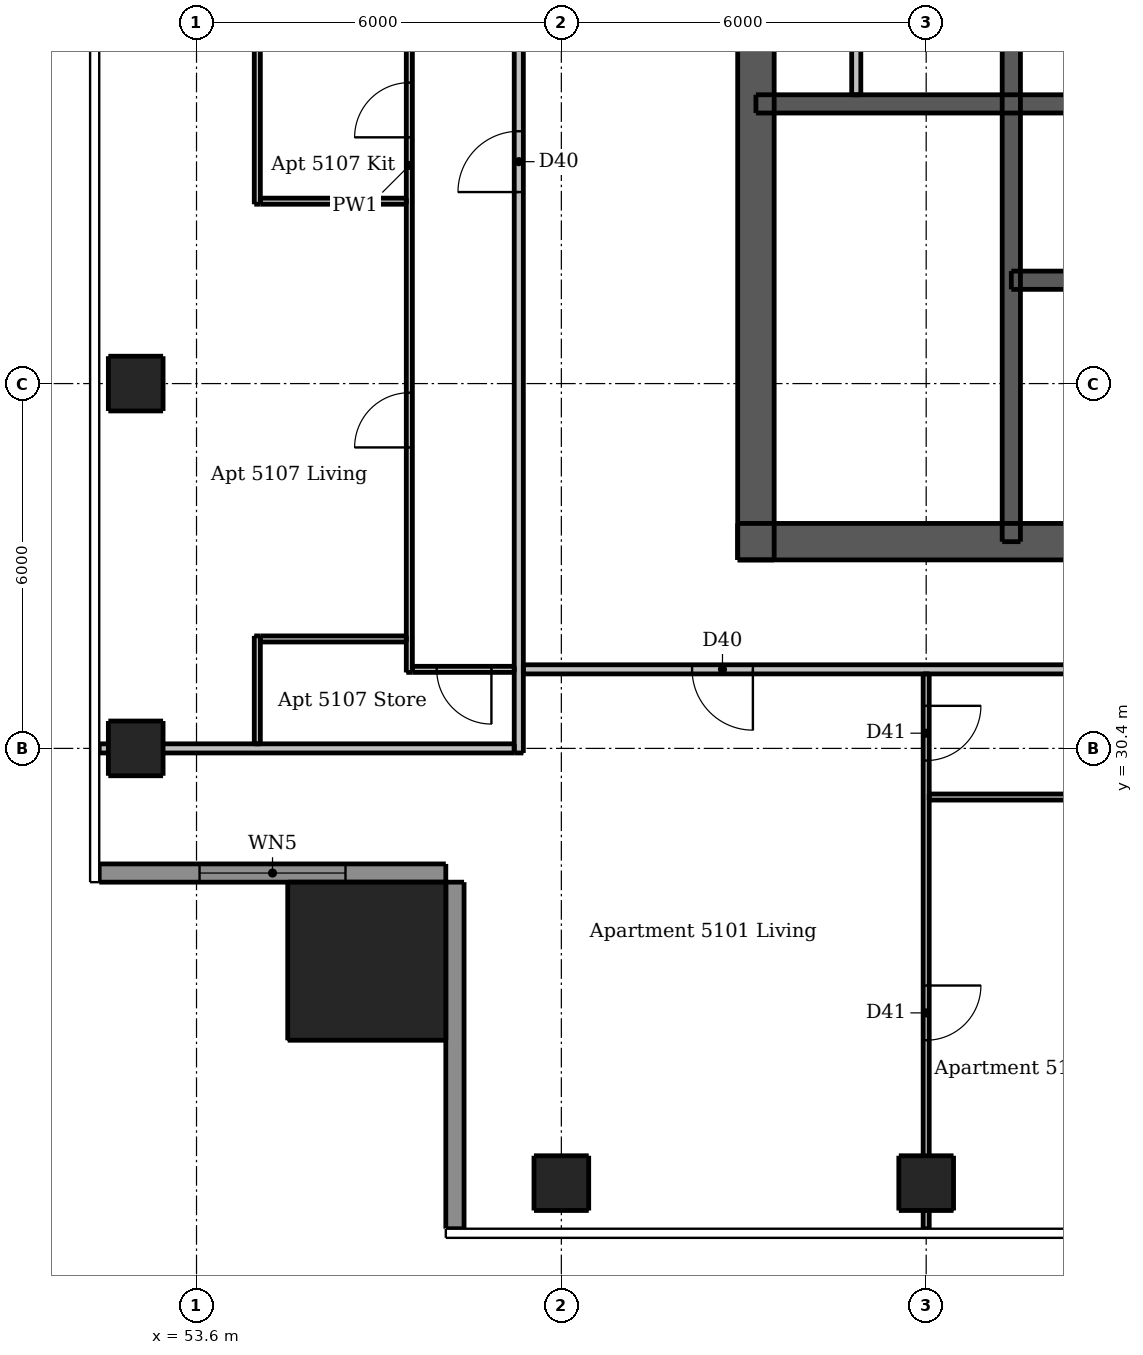
"""IFC4 building model, lengths in metres.
Left out: names, types, materials, properties, quantities, classifications, styles, units other than length and angle.
Written with IfcOpenShell. Run it as: python <this file> out.ifc"""

import sys

from ifc_helpers import new_model, si_unit, direction, frame, frame_2d, origin, origin_2d, place, context, subcontext, project, spatial, rectangle, extrude, element, fill, save


model = new_model("IFC4")
c1 = context("Model", 3, precision=1e-05, world=origin(), true_north=direction((0.0, 1.0)))
c2 = subcontext(c1, "Body", "Model", "MODEL_VIEW")
j1 = project(units=[si_unit("LENGTHUNIT", "METRE"), si_unit("PLANEANGLEUNIT", "RADIAN")], contexts=[c1])
p1 = place(None, origin())
s1 = spatial("IfcSite", under=j1, at=p1, CompositionType="ELEMENT")
p2 = place(p1, origin())
s2 = spatial("IfcBuilding", under=s1, at=p2, CompositionType="ELEMENT")
p3 = place(p2, frame((0.0, 0.0, 193.6)))
s3 = spatial("IfcBuildingStorey", under=s2, at=p3, CompositionType="ELEMENT", Elevation=193.6)
p4 = place(p3, frame((62.5, 33.8, 0.0), z_axis=(0.0, 0.0, 1.0), x_axis=(1.0, 0.0, 0.0)))
e1 = element("IfcWall", 1, at=p4, inside=s3, PredefinedType="SHEAR", context=c2, shape_type="SweptSolid", body=[
    extrude(rectangle(XDim=24.0, YDim=0.6, at=frame_2d((12.0, 0.0))), origin(), (0.0, 0.0, 1.0), 3.05),
])
p5 = place(p4, frame((1.925, 0.0, 0.0)))
e2 = element("IfcOpeningElement", 2, at=p5, cuts=e1, PredefinedType="OPENING", context=c2, shape_type="SweptSolid", body=[
    extrude(rectangle(XDim=1.1, YDim=2.1, at=frame_2d((0.55, 1.05))), frame((0.0, 0.31, 0.0), z_axis=(0.0, -1.0, 0.0), x_axis=(1.0, 0.0, 0.0)), (0.0, 0.0, 1.0), 0.62),
])
p6 = place(p4, frame((20.975, 0.0, 0.0)))
e3 = element("IfcOpeningElement", 3, at=p6, cuts=e1, PredefinedType="OPENING", context=c2, shape_type="SweptSolid", body=[
    extrude(rectangle(XDim=1.1, YDim=2.1, at=frame_2d((0.55, 1.05))), frame((0.0, 0.31, 0.0), z_axis=(0.0, -1.0, 0.0), x_axis=(1.0, 0.0, 0.0)), (0.0, 0.0, 1.0), 0.62),
])
p7 = place(p4, frame((8.0, 0.0, 0.0)))
e4 = element("IfcOpeningElement", 4, at=p7, cuts=e1, PredefinedType="OPENING", context=c2, shape_type="SweptSolid", body=[
    extrude(rectangle(XDim=1.1, YDim=2.1, at=frame_2d((0.55, 1.05))), frame((0.0, 0.31, 0.0), z_axis=(0.0, -1.0, 0.0), x_axis=(1.0, 0.0, 0.0)), (0.0, 0.0, 1.0), 0.62),
])
p8 = place(p4, frame((13.5, 0.0, 0.0)))
e5 = element("IfcOpeningElement", 5, at=p8, cuts=e1, PredefinedType="OPENING", context=c2, shape_type="SweptSolid", body=[
    extrude(rectangle(XDim=0.9, YDim=2.1, at=frame_2d((0.45, 1.05))), frame((0.0, 0.31, 0.0), z_axis=(0.0, -1.0, 0.0), x_axis=(1.0, 0.0, 0.0)), (0.0, 0.0, 1.0), 0.62),
])
p9 = place(p4, frame((17.1, 0.0, 0.0)))
e6 = element("IfcOpeningElement", 6, at=p9, cuts=e1, PredefinedType="OPENING", context=c2, shape_type="SweptSolid", body=[
    extrude(rectangle(XDim=0.9, YDim=2.1, at=frame_2d((0.45, 1.05))), frame((0.0, 0.31, 0.0), z_axis=(0.0, -1.0, 0.0), x_axis=(1.0, 0.0, 0.0)), (0.0, 0.0, 1.0), 0.62),
])
p10 = place(p3, frame((62.8, 33.5, 0.0), z_axis=(0.0, 0.0, 1.0), x_axis=(0.0, 1.0, 0.0)))
e7 = element("IfcWall", 7, at=p10, inside=s3, PredefinedType="SHEAR", context=c2, shape_type="SweptSolid", body=[
    extrude(rectangle(XDim=24.0, YDim=0.6, at=frame_2d((12.0, 0.0))), origin(), (0.0, 0.0, 1.0), 3.05),
])
p11 = place(p10, frame((11.2, 0.0, 0.0)))
e8 = element("IfcOpeningElement", 8, at=p11, cuts=e7, PredefinedType="OPENING", context=c2, shape_type="SweptSolid", body=[
    extrude(rectangle(XDim=1.6, YDim=2.1, at=frame_2d((0.8, 1.05))), frame((0.0, 0.31, 0.0), z_axis=(0.0, -1.0, 0.0), x_axis=(1.0, 0.0, 0.0)), (0.0, 0.0, 1.0), 0.62),
])
p12 = place(p3, frame((62.8, 41.0, 0.0), z_axis=(0.0, 0.0, 1.0), x_axis=(1.0, 0.0, 0.0)))
e9 = element("IfcWall", 9, at=p12, inside=s3, PredefinedType="SHEAR", context=c2, shape_type="SweptSolid", body=[
    extrude(rectangle(XDim=23.4, YDim=0.3, at=frame_2d((11.7, 0.0))), origin(), (0.0, 0.0, 1.0), 3.05),
])
p13 = place(p3, frame((67.0, 33.8, 0.0), z_axis=(0.0, 0.0, 1.0), x_axis=(0.0, 1.0, 0.0)))
e10 = element("IfcWall", 10, at=p13, inside=s3, PredefinedType="SHEAR", context=c2, shape_type="SweptSolid", body=[
    extrude(rectangle(XDim=10.1, YDim=0.3, at=frame_2d((5.05, 0.0))), origin(), (0.0, 0.0, 1.0), 3.05),
])
p14 = place(p13, frame((0.5, 0.0, 0.0)))
e11 = element("IfcOpeningElement", 11, at=p14, cuts=e10, PredefinedType="OPENING", context=c2, shape_type="SweptSolid", body=[
    extrude(rectangle(XDim=1.1, YDim=2.1, at=frame_2d((0.55, 1.05))), frame((0.0, 0.16, 0.0), z_axis=(0.0, -1.0, 0.0), x_axis=(1.0, 0.0, 0.0)), (0.0, 0.0, 1.0), 0.32),
])
p15 = place(p3, frame((67.0, 38.1, 0.0), z_axis=(0.0, 0.0, 1.0), x_axis=(1.0, 0.0, 0.0)))
e12 = element("IfcWall", 12, at=p15, inside=s3, PredefinedType="SHEAR", context=c2, shape_type="SweptSolid", body=[
    extrude(rectangle(XDim=7.5, YDim=0.3, at=frame_2d((3.75, 0.0))), origin(), (0.0, 0.0, 1.0), 3.05),
])
p16 = place(p15, frame((0.7, 0.0, 0.0)))
e13 = element("IfcOpeningElement", 13, at=p16, cuts=e12, PredefinedType="OPENING", context=c2, shape_type="SweptSolid", body=[
    extrude(rectangle(XDim=1.1, YDim=2.1, at=frame_2d((0.55, 1.05))), frame((0.0, 0.16, 0.0), z_axis=(0.0, -1.0, 0.0), x_axis=(1.0, 0.0, 0.0)), (0.0, 0.0, 1.0), 0.32),
])
p17 = place(p15, frame((3.2, 0.0, 0.0)))
e14 = element("IfcOpeningElement", 14, at=p17, cuts=e12, PredefinedType="OPENING", context=c2, shape_type="SweptSolid", body=[
    extrude(rectangle(XDim=1.1, YDim=2.1, at=frame_2d((0.55, 1.05))), frame((0.0, 0.16, 0.0), z_axis=(0.0, -1.0, 0.0), x_axis=(1.0, 0.0, 0.0)), (0.0, 0.0, 1.0), 0.32),
])
p18 = place(p15, frame((5.65, 0.0, 0.0)))
e15 = element("IfcOpeningElement", 15, at=p18, cuts=e12, PredefinedType="OPENING", context=c2, shape_type="SweptSolid", body=[
    extrude(rectangle(XDim=1.2, YDim=2.1, at=frame_2d((0.6, 1.05))), frame((0.0, 0.16, 0.0), z_axis=(0.0, -1.0, 0.0), x_axis=(1.0, 0.0, 0.0)), (0.0, 0.0, 1.0), 0.32),
])
for number, where, z_axis, x_axis in (
    (16, (59.6, 23.25, 0.0), (0.0, 0.0, 1.0), (1.0, 0.0, 0.0)),
    (17, (65.6, 23.25, 0.0), (0.0, 0.0, 1.0), (1.0, 0.0, 0.0)),
    (18, (52.6, 30.4, 0.0), (0.0, 0.0, 1.0), (1.0, 0.0, 0.0)),
    (19, (52.6, 36.4, 0.0), (0.0, 0.0, 1.0), (1.0, 0.0, 0.0)),
):
    element("IfcColumn", number, at=place(p3, frame(where, z_axis=z_axis, x_axis=x_axis)), inside=s3, PredefinedType="COLUMN", context=c2, shape_type="SweptSolid", body=[
        extrude(rectangle(XDim=0.9, YDim=0.9, at=origin_2d()), origin(), (0.0, 0.0, 1.0), 3.05),
    ])
p19 = place(p3, frame((56.4, 26.9, 0.0), z_axis=(0.0, 0.0, 1.0), x_axis=(1.0, 0.0, 0.0)))
e20 = element("IfcColumn", 20, at=p19, inside=s3, PredefinedType="COLUMN", context=c2, shape_type="SweptSolid", body=[
    extrude(rectangle(XDim=2.6, YDim=2.6, at=origin_2d()), origin(), (0.0, 0.0, 1.0), 3.3),
])
p20 = place(p3, frame((52.0, 28.35, 0.0), z_axis=(0.0, 0.0, 1.0), x_axis=(1.0, 0.0, 0.0)))
e21 = element("IfcWall", 21, at=p20, inside=s3, PredefinedType="SOLIDWALL", context=c2, shape_type="SweptSolid", body=[
    extrude(rectangle(XDim=5.7, YDim=0.3, at=frame_2d((2.85, 0.0))), origin(), (0.0, 0.0, 1.0), 3.05),
])
p21 = place(p20, frame((1.65, 0.0, 0.15)))
e22 = element("IfcOpeningElement", 22, at=p21, cuts=e21, PredefinedType="OPENING", context=c2, shape_type="SweptSolid", body=[
    extrude(rectangle(XDim=2.4, YDim=2.1, at=frame_2d((1.2, 1.05))), frame((0.0, 0.16, 0.0), z_axis=(0.0, -1.0, 0.0), x_axis=(1.0, 0.0, 0.0)), (0.0, 0.0, 1.0), 0.32),
])
p22 = place(p3, frame((57.85, 28.2, 0.0), z_axis=(0.0, 0.0, 1.0), x_axis=(0.0, -1.0, 0.0)))
e23 = element("IfcWall", 23, at=p22, inside=s3, PredefinedType="SOLIDWALL", context=c2, shape_type="SweptSolid", body=[
    extrude(rectangle(XDim=5.7, YDim=0.3, at=frame_2d((2.85, 0.0))), origin(), (0.0, 0.0, 1.0), 3.05),
])
p23 = place(p3, frame((64.45, 41.15, 0.0), z_axis=(0.0, 0.0, 1.0), x_axis=(0.0, 1.0, 0.0)))
e24 = element("IfcWall", 24, at=p23, inside=s3, PredefinedType="PLUMBINGWALL", context=c2, shape_type="SweptSolid", body=[
    extrude(rectangle(XDim=2.6, YDim=0.15, at=frame_2d((1.3, 0.0))), origin(), (0.0, 0.0, 1.0), 3.05),
])
p24 = place(p3, frame((54.6, 30.475, 0.0), z_axis=(0.0, 0.0, 1.0), x_axis=(0.0, 1.0, 0.0)))
e25 = element("IfcWall", 25, at=p24, inside=s3, PredefinedType="PARTITIONING", context=c2, shape_type="SweptSolid", body=[
    extrude(rectangle(XDim=1.775, YDim=0.1, at=frame_2d((0.887, 0.0))), origin(), (0.0, 0.0, 1.0), 3.05),
])
p25 = place(p3, frame((54.6, 39.35, 0.0), z_axis=(0.0, 0.0, 1.0), x_axis=(0.0, 1.0, 0.0)))
e26 = element("IfcWall", 26, at=p25, inside=s3, PredefinedType="PARTITIONING", context=c2, shape_type="SweptSolid", body=[
    extrude(rectangle(XDim=5.5, YDim=0.1, at=frame_2d((2.75, 0.0))), origin(), (0.0, 0.0, 1.0), 3.05),
])
p26 = place(p3, frame((57.1, 31.65, 0.0), z_axis=(0.0, 0.0, 1.0), x_axis=(0.0, 1.0, 0.0)))
e27 = element("IfcWall", 27, at=p26, inside=s3, PredefinedType="PARTITIONING", context=c2, shape_type="SweptSolid", body=[
    extrude(rectangle(XDim=16.675, YDim=0.1, at=frame_2d((8.337, 0.0))), origin(), (0.0, 0.0, 1.0), 3.05),
])
p27 = place(p26, frame((3.7, 0.0, 0.0)))
e28 = element("IfcOpeningElement", 28, at=p27, cuts=e27, PredefinedType="OPENING", context=c2, shape_type="SweptSolid", body=[
    extrude(rectangle(XDim=0.9, YDim=2.1, at=frame_2d((0.45, 1.05))), frame((0.0, 0.06, 0.0), z_axis=(0.0, -1.0, 0.0), x_axis=(1.0, 0.0, 0.0)), (0.0, 0.0, 1.0), 0.12),
])
p28 = place(p26, frame((8.8, 0.0, 0.0)))
e29 = element("IfcOpeningElement", 29, at=p28, cuts=e27, PredefinedType="OPENING", context=c2, shape_type="SweptSolid", body=[
    extrude(rectangle(XDim=0.9, YDim=2.1, at=frame_2d((0.45, 1.05))), frame((0.0, 0.06, 0.0), z_axis=(0.0, -1.0, 0.0), x_axis=(1.0, 0.0, 0.0)), (0.0, 0.0, 1.0), 0.12),
])
p29 = place(p26, frame((14.5, 0.0, 0.0)))
e30 = element("IfcOpeningElement", 30, at=p29, cuts=e27, PredefinedType="OPENING", context=c2, shape_type="SweptSolid", body=[
    extrude(rectangle(XDim=0.9, YDim=2.1, at=frame_2d((0.45, 1.05))), frame((0.0, 0.06, 0.0), z_axis=(0.0, -1.0, 0.0), x_axis=(1.0, 0.0, 0.0)), (0.0, 0.0, 1.0), 0.12),
])
p30 = place(p26, frame((11.55, 0.0, 0.0)))
e31 = element("IfcOpeningElement", 31, at=p30, cuts=e27, PredefinedType="OPENING", context=c2, shape_type="SweptSolid", body=[
    extrude(rectangle(XDim=0.8, YDim=2.1, at=frame_2d((0.4, 1.05))), frame((0.0, 0.06, 0.0), z_axis=(0.0, -1.0, 0.0), x_axis=(1.0, 0.0, 0.0)), (0.0, 0.0, 1.0), 0.12),
])
p31 = place(p3, frame((65.6, 31.625, 0.0), z_axis=(0.0, 0.0, 1.0), x_axis=(0.0, -1.0, 0.0)))
e32 = element("IfcWall", 32, at=p31, inside=s3, PredefinedType="PARTITIONING", context=c2, shape_type="SweptSolid", body=[
    extrude(rectangle(XDim=9.125, YDim=0.1, at=frame_2d((4.562, 0.0))), origin(), (0.0, 0.0, 1.0), 2.516),
])
p32 = place(p31, frame((0.525, 0.0, 0.0)))
e33 = element("IfcOpeningElement", 33, at=p32, cuts=e32, PredefinedType="OPENING", context=c2, shape_type="SweptSolid", body=[
    extrude(rectangle(XDim=0.9, YDim=2.1, at=frame_2d((0.45, 1.05))), frame((0.0, 0.06, 0.0), z_axis=(0.0, -1.0, 0.0), x_axis=(1.0, 0.0, 0.0)), (0.0, 0.0, 1.0), 0.12),
])
p33 = place(p31, frame((5.125, 0.0, 0.0)))
e34 = element("IfcOpeningElement", 34, at=p33, cuts=e32, PredefinedType="OPENING", context=c2, shape_type="SweptSolid", body=[
    extrude(rectangle(XDim=0.9, YDim=2.1, at=frame_2d((0.45, 1.05))), frame((0.0, 0.06, 0.0), z_axis=(0.0, -1.0, 0.0), x_axis=(1.0, 0.0, 0.0)), (0.0, 0.0, 1.0), 0.12),
])
for number, where, z_axis, x_axis in (
    (35, (54.65, 39.4, 0.0), (0.0, 0.0, 1.0), (1.0, 0.0, 0.0)),
    (36, (54.65, 32.2, 0.0), (0.0, 0.0, 1.0), (1.0, 0.0, 0.0)),
):
    element("IfcWall", number, at=place(p3, frame(where, z_axis=z_axis, x_axis=x_axis)), inside=s3, PredefinedType="PARTITIONING", context=c2, shape_type="SweptSolid", body=[
        extrude(rectangle(XDim=2.4, YDim=0.1, at=frame_2d((1.2, 0.0))), origin(), (0.0, 0.0, 1.0), 3.05),
    ])
p34 = place(p3, frame((58.825, 31.7, 0.0), z_axis=(0.0, 0.0, 1.0), x_axis=(-1.0, 0.0, 0.0)))
e37 = element("IfcWall", 37, at=p34, inside=s3, PredefinedType="PARTITIONING", context=c2, shape_type="SweptSolid", body=[
    extrude(rectangle(XDim=1.675, YDim=0.1, at=frame_2d((0.837, 0.0))), origin(), (0.0, 0.0, 1.0), 3.05),
])
p35 = place(p34, frame((0.375, 0.0, 0.0)))
e38 = element("IfcOpeningElement", 38, at=p35, cuts=e37, PredefinedType="OPENING", context=c2, shape_type="SweptSolid", body=[
    extrude(rectangle(XDim=0.9, YDim=2.1, at=frame_2d((0.45, 1.05))), frame((0.0, 0.06, 0.0), z_axis=(0.0, -1.0, 0.0), x_axis=(1.0, 0.0, 0.0)), (0.0, 0.0, 1.0), 0.12),
])
p36 = place(p3, frame((65.65, 29.6, 0.0), z_axis=(0.0, 0.0, 1.0), x_axis=(1.0, 0.0, 0.0)))
e39 = element("IfcWall", 39, at=p36, inside=s3, PredefinedType="PARTITIONING", context=c2, shape_type="SweptSolid", body=[
    extrude(rectangle(XDim=5.875, YDim=0.1, at=frame_2d((2.938, 0.0))), origin(), (0.0, 0.0, 1.0), 3.05),
])
p37 = place(p36, frame((3.75, 0.0, 0.0)))
e40 = element("IfcOpeningElement", 40, at=p37, cuts=e39, PredefinedType="OPENING", context=c2, shape_type="SweptSolid", body=[
    extrude(rectangle(XDim=0.8, YDim=2.1, at=frame_2d((0.4, 1.05))), frame((0.0, 0.06, 0.0), z_axis=(0.0, -1.0, 0.0), x_axis=(1.0, 0.0, 0.0)), (0.0, 0.0, 1.0), 0.12),
])
p38 = place(p3, frame((58.9, 30.325, 0.0), z_axis=(0.0, 0.0, 1.0), x_axis=(0.0, 1.0, 0.0)))
e41 = element("IfcWall", 41, at=p38, inside=s3, PredefinedType="PARTITIONING", context=c2, shape_type="SweptSolid", body=[
    extrude(rectangle(XDim=30.85, YDim=0.15, at=frame_2d((15.425, 0.0))), origin(), (0.0, 0.0, 1.0), 3.05),
])
p39 = place(p38, frame((9.225, 0.0, 0.0)))
e42 = element("IfcOpeningElement", 42, at=p39, cuts=e41, PredefinedType="OPENING", context=c2, shape_type="SweptSolid", body=[
    extrude(rectangle(XDim=1.0, YDim=2.1, at=frame_2d((0.5, 1.05))), frame((0.0, 0.085, 0.0), z_axis=(0.0, -1.0, 0.0), x_axis=(1.0, 0.0, 0.0)), (0.0, 0.0, 1.0), 0.17),
])
p40 = place(p38, frame((26.925, 0.0, 0.0)))
e43 = element("IfcOpeningElement", 43, at=p40, cuts=e41, PredefinedType="OPENING", context=c2, shape_type="SweptSolid", body=[
    extrude(rectangle(XDim=1.0, YDim=2.1, at=frame_2d((0.5, 1.05))), frame((0.0, 0.085, 0.0), z_axis=(0.0, -1.0, 0.0), x_axis=(1.0, 0.0, 0.0)), (0.0, 0.0, 1.0), 0.17),
])
p41 = place(p3, frame((89.525, 31.7, 0.0), z_axis=(0.0, 0.0, 1.0), x_axis=(-1.0, 0.0, 0.0)))
e44 = element("IfcWall", 44, at=p41, inside=s3, PredefinedType="PARTITIONING", context=c2, shape_type="SweptSolid", body=[
    extrude(rectangle(XDim=30.55, YDim=0.15, at=frame_2d((15.275, 0.0))), origin(), (0.0, 0.0, 1.0), 3.05),
])
p42 = place(p41, frame((26.775, 0.0, 0.0)))
e45 = element("IfcOpeningElement", 45, at=p42, cuts=e44, PredefinedType="OPENING", context=c2, shape_type="SweptSolid", body=[
    extrude(rectangle(XDim=1.0, YDim=2.1, at=frame_2d((0.5, 1.05))), frame((0.0, 0.085, 0.0), z_axis=(0.0, -1.0, 0.0), x_axis=(1.0, 0.0, 0.0)), (0.0, 0.0, 1.0), 0.17),
])
p43 = place(p41, frame((9.075, 0.0, 0.0)))
e46 = element("IfcOpeningElement", 46, at=p43, cuts=e44, PredefinedType="OPENING", context=c2, shape_type="SweptSolid", body=[
    extrude(rectangle(XDim=1.0, YDim=2.1, at=frame_2d((0.5, 1.05))), frame((0.0, 0.085, 0.0), z_axis=(0.0, -1.0, 0.0), x_axis=(1.0, 0.0, 0.0)), (0.0, 0.0, 1.0), 0.17),
])
p44 = place(p3, frame((52.0, 30.4, 0.0), z_axis=(0.0, 0.0, 1.0), x_axis=(1.0, 0.0, 0.0)))
e47 = element("IfcWall", 47, at=p44, inside=s3, PredefinedType="PARTITIONING", context=c2, shape_type="SweptSolid", body=[
    extrude(rectangle(XDim=6.825, YDim=0.15, at=frame_2d((3.413, 0.0))), origin(), (0.0, 0.0, 1.0), 2.647),
])
p45 = place(p21, origin())
e48 = element("IfcWindow", 48, at=p45, inside=s3, PartitioningType="DOUBLE_PANEL_VERTICAL", PredefinedType="WINDOW", context=c2, shape_type="SweptSolid", body=[
    extrude(rectangle(XDim=2.4, YDim=2.1, at=frame_2d((1.2, 1.05))), frame((0.0, 0.03, 0.0), z_axis=(0.0, -1.0, 0.0), x_axis=(1.0, 0.0, 0.0)), (0.0, 0.0, 1.0), 0.06),
])
fill(e22, e48)
p46 = place(p5, origin())
e49 = element("IfcDoor", 49, at=p46, inside=s3, OperationType="SINGLE_SWING_LEFT", PredefinedType="DOOR", context=c2, shape_type="SweptSolid", body=[
    extrude(rectangle(XDim=1.1, YDim=2.1, at=frame_2d((0.55, 1.05))), frame((0.0, 0.288, 0.0), z_axis=(0.0, -1.0, 0.0), x_axis=(1.0, 0.0, 0.0)), (0.0, 0.0, 1.0), 0.05),
])
fill(e2, e49)
p47 = place(p14, origin())
e50 = element("IfcDoor", 50, at=p47, inside=s3, OperationType="SINGLE_SWING_RIGHT", PredefinedType="DOOR", context=c2, shape_type="SweptSolid", body=[
    extrude(rectangle(XDim=1.1, YDim=2.1, at=frame_2d((0.55, 1.05))), frame((0.0, -0.087, 0.0), z_axis=(0.0, -1.0, 0.0), x_axis=(1.0, 0.0, 0.0)), (0.0, 0.0, 1.0), 0.05),
])
fill(e11, e50)
p48 = place(p16, origin())
e51 = element("IfcDoor", 51, at=p48, inside=s3, OperationType="DOUBLE_DOOR_SLIDING", PredefinedType="DOOR", context=c2, shape_type="SweptSolid", body=[
    extrude(rectangle(XDim=1.1, YDim=2.1, at=frame_2d((0.55, 1.05))), frame((0.0, 0.025, 0.0), z_axis=(0.0, -1.0, 0.0), x_axis=(1.0, 0.0, 0.0)), (0.0, 0.0, 1.0), 0.05),
])
fill(e13, e51)
p49 = place(p42, origin())
e52 = element("IfcDoor", 52, at=p49, inside=s3, OperationType="SINGLE_SWING_LEFT", PredefinedType="DOOR", context=c2, shape_type="SweptSolid", body=[
    extrude(rectangle(XDim=1.0, YDim=2.1, at=frame_2d((0.5, 1.05))), frame((0.0, 0.025, 0.0), z_axis=(0.0, -1.0, 0.0), x_axis=(1.0, 0.0, 0.0)), (0.0, 0.0, 1.0), 0.05),
])
fill(e45, e52)
p50 = place(p32, origin())
e53 = element("IfcDoor", 53, at=p50, inside=s3, OperationType="SINGLE_SWING_LEFT", PredefinedType="DOOR", context=c2, shape_type="SweptSolid", body=[
    extrude(rectangle(XDim=0.9, YDim=2.1, at=frame_2d((0.45, 1.05))), frame((0.0, 0.025, 0.0), z_axis=(0.0, -1.0, 0.0), x_axis=(1.0, 0.0, 0.0)), (0.0, 0.0, 1.0), 0.05),
])
fill(e33, e53)
p51 = place(p33, origin())
e54 = element("IfcDoor", 54, at=p51, inside=s3, OperationType="SINGLE_SWING_LEFT", PredefinedType="DOOR", context=c2, shape_type="SweptSolid", body=[
    extrude(rectangle(XDim=0.9, YDim=2.1, at=frame_2d((0.45, 1.05))), frame((0.0, 0.025, 0.0), z_axis=(0.0, -1.0, 0.0), x_axis=(1.0, 0.0, 0.0)), (0.0, 0.0, 1.0), 0.05),
])
fill(e34, e54)
p52 = place(p39, origin())
e55 = element("IfcDoor", 55, at=p52, inside=s3, OperationType="SINGLE_SWING_LEFT", PredefinedType="DOOR", context=c2, shape_type="SweptSolid", body=[
    extrude(rectangle(XDim=1.0, YDim=2.1, at=frame_2d((0.5, 1.05))), frame((0.0, 0.025, 0.0), z_axis=(0.0, -1.0, 0.0), x_axis=(1.0, 0.0, 0.0)), (0.0, 0.0, 1.0), 0.05),
])
fill(e42, e55)
p53 = place(p27, origin())
e56 = element("IfcDoor", 56, at=p53, inside=s3, OperationType="SINGLE_SWING_LEFT", PredefinedType="DOOR", context=c2, shape_type="SweptSolid", body=[
    extrude(rectangle(XDim=0.9, YDim=2.1, at=frame_2d((0.45, 1.05))), frame((0.0, 0.025, 0.0), z_axis=(0.0, -1.0, 0.0), x_axis=(1.0, 0.0, 0.0)), (0.0, 0.0, 1.0), 0.05),
])
fill(e28, e56)
p54 = place(p28, origin())
e57 = element("IfcDoor", 57, at=p54, inside=s3, OperationType="SINGLE_SWING_LEFT", PredefinedType="DOOR", context=c2, shape_type="SweptSolid", body=[
    extrude(rectangle(XDim=0.9, YDim=2.1, at=frame_2d((0.45, 1.05))), frame((0.0, 0.025, 0.0), z_axis=(0.0, -1.0, 0.0), x_axis=(1.0, 0.0, 0.0)), (0.0, 0.0, 1.0), 0.05),
])
fill(e29, e57)
p55 = place(p35, origin())
e58 = element("IfcDoor", 58, at=p55, inside=s3, OperationType="SINGLE_SWING_LEFT", PredefinedType="DOOR", context=c2, shape_type="SweptSolid", body=[
    extrude(rectangle(XDim=0.9, YDim=2.1, at=frame_2d((0.45, 1.05))), frame((0.0, 0.025, 0.0), z_axis=(0.0, -1.0, 0.0), x_axis=(1.0, 0.0, 0.0)), (0.0, 0.0, 1.0), 0.05),
])
fill(e38, e58)
save(model, sys.argv[1])
